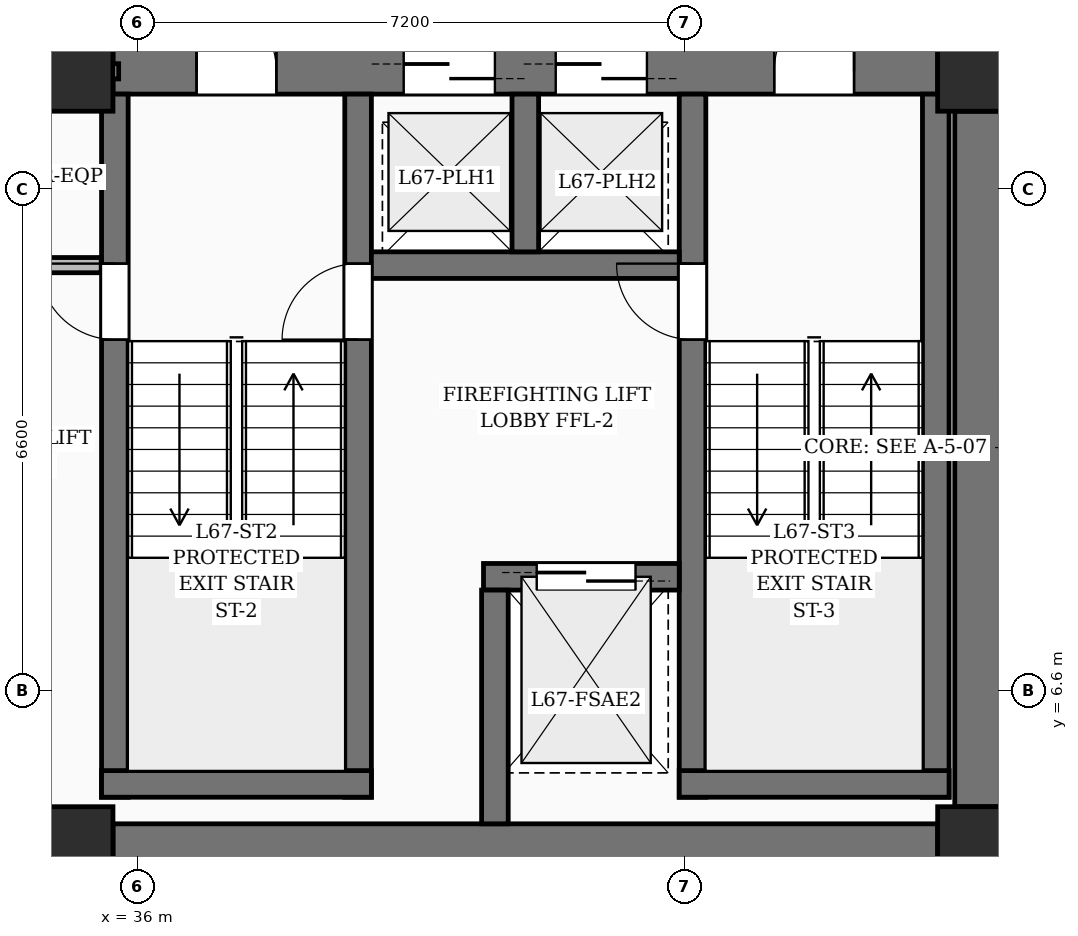
"""IFC4 building model, lengths in metres.
Left out: names, types, materials, properties, quantities, classifications, styles, units other than length and angle.
Written with IfcOpenShell. Run it as: python <this file> out.ifc"""

import sys

from ifc_helpers import new_model, si_unit, direction, frame, frame_2d, origin, origin_2d, place, context, subcontext, project, spatial, rectangle, extrude, element, fill, save


model = new_model("IFC4")
c1 = context("Model", 3, precision=1e-05, world=origin(), true_north=direction((0.0, 1.0)))
c2 = subcontext(c1, "Body", "Model", "MODEL_VIEW")
j1 = project(units=[si_unit("LENGTHUNIT", "METRE"), si_unit("PLANEANGLEUNIT", "RADIAN")], contexts=[c1])
p1 = place(None, origin())
s1 = spatial("IfcSite", under=j1, at=p1, CompositionType="ELEMENT")
p2 = place(p1, origin())
s2 = spatial("IfcBuilding", under=s1, at=p2, CompositionType="ELEMENT")
p3 = place(p2, frame((0.0, 0.0, 259.5)))
s3 = spatial("IfcBuildingStorey", under=s2, at=p3, CompositionType="ELEMENT", Elevation=259.5)
for number, where, z_axis, x_axis in (
    (1, (35.15, 4.55, 0.0), (0.0, 0.0, 1.0), (1.0, 0.0, 0.0)),
    (2, (47.05, 4.55, 0.0), (0.0, 0.0, 1.0), (1.0, 0.0, 0.0)),
    (3, (35.15, 14.75, 0.0), (0.0, 0.0, 1.0), (1.0, 0.0, 0.0)),
    (4, (47.05, 14.75, 0.0), (0.0, 0.0, 1.0), (1.0, 0.0, 0.0)),
):
    element("IfcColumn", number, at=place(p3, frame(where, z_axis=z_axis, x_axis=x_axis)), inside=s3, PredefinedType="COLUMN", context=c2, shape_type="SweptSolid", body=[
        extrude(rectangle(XDim=1.05, YDim=1.05, at=origin_2d()), origin(), (0.0, 0.0, 1.0), 3.75),
    ])
p4 = place(p3, frame((35.675, 4.55, 0.0), z_axis=(0.0, 0.0, 1.0), x_axis=(1.0, 0.0, 0.0)))
e5 = element("IfcWall", 5, at=p4, inside=s3, PredefinedType="SHEAR", context=c2, shape_type="SweptSolid", body=[
    extrude(rectangle(XDim=10.85, YDim=0.6, at=frame_2d((5.425, 0.0))), origin(), (0.0, 0.0, 1.0), 3.75),
])
p5 = place(p3, frame((35.675, 14.75, 0.0), z_axis=(0.0, 0.0, 1.0), x_axis=(1.0, 0.0, 0.0)))
e6 = element("IfcWall", 6, at=p5, inside=s3, PredefinedType="SHEAR", context=c2, shape_type="SweptSolid", body=[
    extrude(rectangle(XDim=10.85, YDim=0.6, at=frame_2d((5.425, 0.0))), origin(), (0.0, 0.0, 1.0), 3.75),
])
p6 = place(p5, frame((1.1, 0.0, 0.0)))
e7 = element("IfcOpeningElement", 7, at=p6, cuts=e6, PredefinedType="OPENING", context=c2, shape_type="SweptSolid", body=[
    extrude(rectangle(XDim=1.05, YDim=2.15, at=frame_2d((0.525, 1.075))), frame((0.0, 0.31, 0.0), z_axis=(0.0, -1.0, 0.0), x_axis=(1.0, 0.0, 0.0)), (0.0, 0.0, 1.0), 0.62),
])
p7 = place(p5, frame((8.7, 0.0, 0.0)))
e8 = element("IfcOpeningElement", 8, at=p7, cuts=e6, PredefinedType="OPENING", context=c2, shape_type="SweptSolid", body=[
    extrude(rectangle(XDim=1.05, YDim=2.15, at=frame_2d((0.525, 1.075))), frame((0.0, 0.31, 0.0), z_axis=(0.0, -1.0, 0.0), x_axis=(1.0, 0.0, 0.0)), (0.0, 0.0, 1.0), 0.62),
])
p8 = place(p5, frame((3.825, 0.0, 0.0)))
e9 = element("IfcOpeningElement", 9, at=p8, cuts=e6, PredefinedType="OPENING", context=c2, shape_type="SweptSolid", body=[
    extrude(rectangle(XDim=1.2, YDim=2.2, at=frame_2d((0.6, 1.1))), frame((0.0, 0.31, 0.0), z_axis=(0.0, -1.0, 0.0), x_axis=(1.0, 0.0, 0.0)), (0.0, 0.0, 1.0), 0.62),
])
p9 = place(p5, frame((5.825, 0.0, 0.0)))
e10 = element("IfcOpeningElement", 10, at=p9, cuts=e6, PredefinedType="OPENING", context=c2, shape_type="SweptSolid", body=[
    extrude(rectangle(XDim=1.2, YDim=2.2, at=frame_2d((0.6, 1.1))), frame((0.0, 0.31, 0.0), z_axis=(0.0, -1.0, 0.0), x_axis=(1.0, 0.0, 0.0)), (0.0, 0.0, 1.0), 0.62),
])
p10 = place(p3, frame((47.05, 5.075, 0.0), z_axis=(0.0, 0.0, 1.0), x_axis=(0.0, 1.0, 0.0)))
e11 = element("IfcWall", 11, at=p10, inside=s3, PredefinedType="SHEAR", context=c2, shape_type="SweptSolid", body=[
    extrude(rectangle(XDim=9.15, YDim=0.6, at=frame_2d((4.575, 0.0))), origin(), (0.0, 0.0, 1.0), 3.75),
])
p11 = place(p3, frame((35.7, 5.2, 0.0), z_axis=(0.0, 0.0, 1.0), x_axis=(0.0, 1.0, 0.0)))
e12 = element("IfcWall", 12, at=p11, inside=s3, PredefinedType="SOLIDWALL", context=c2, shape_type="SweptSolid", body=[
    extrude(rectangle(XDim=9.25, YDim=0.35, at=frame_2d((4.625, 0.0))), origin(), (0.0, 0.0, 1.0), 3.75),
])
p12 = place(p11, frame((6.02, 0.0, 0.0)))
e13 = element("IfcOpeningElement", 13, at=p12, cuts=e12, PredefinedType="OPENING", context=c2, shape_type="SweptSolid", body=[
    extrude(rectangle(XDim=1.0, YDim=2.15, at=frame_2d((0.5, 1.075))), frame((0.0, 0.185, 0.0), z_axis=(0.0, -1.0, 0.0), x_axis=(1.0, 0.0, 0.0)), (0.0, 0.0, 1.0), 0.37),
])
p13 = place(p3, frame((38.9, 5.2, 0.0), z_axis=(0.0, 0.0, 1.0), x_axis=(0.0, 1.0, 0.0)))
e14 = element("IfcWall", 14, at=p13, inside=s3, PredefinedType="SOLIDWALL", context=c2, shape_type="SweptSolid", body=[
    extrude(rectangle(XDim=9.25, YDim=0.35, at=frame_2d((4.625, 0.0))), origin(), (0.0, 0.0, 1.0), 3.75),
])
p14 = place(p13, frame((6.02, 0.0, 0.0)))
e15 = element("IfcOpeningElement", 15, at=p14, cuts=e14, PredefinedType="OPENING", context=c2, shape_type="SweptSolid", body=[
    extrude(rectangle(XDim=1.0, YDim=2.15, at=frame_2d((0.5, 1.075))), frame((0.0, 0.185, 0.0), z_axis=(0.0, -1.0, 0.0), x_axis=(1.0, 0.0, 0.0)), (0.0, 0.0, 1.0), 0.37),
])
p15 = place(p3, frame((35.525, 5.375, 0.0), z_axis=(0.0, 0.0, 1.0), x_axis=(1.0, 0.0, 0.0)))
e16 = element("IfcWall", 16, at=p15, inside=s3, PredefinedType="SOLIDWALL", context=c2, shape_type="SweptSolid", body=[
    extrude(rectangle(XDim=3.55, YDim=0.35, at=frame_2d((1.775, 0.0))), origin(), (0.0, 0.0, 1.0), 3.75),
])
p16 = place(p3, frame((43.3, 5.2, 0.0), z_axis=(0.0, 0.0, 1.0), x_axis=(0.0, 1.0, 0.0)))
e17 = element("IfcWall", 17, at=p16, inside=s3, PredefinedType="SOLIDWALL", context=c2, shape_type="SweptSolid", body=[
    extrude(rectangle(XDim=9.25, YDim=0.35, at=frame_2d((4.625, 0.0))), origin(), (0.0, 0.0, 1.0), 3.75),
])
p17 = place(p16, frame((6.02, 0.0, 0.0)))
e18 = element("IfcOpeningElement", 18, at=p17, cuts=e17, PredefinedType="OPENING", context=c2, shape_type="SweptSolid", body=[
    extrude(rectangle(XDim=1.0, YDim=2.15, at=frame_2d((0.5, 1.075))), frame((0.0, 0.185, 0.0), z_axis=(0.0, -1.0, 0.0), x_axis=(1.0, 0.0, 0.0)), (0.0, 0.0, 1.0), 0.37),
])
p18 = place(p3, frame((46.5, 5.2, 0.0), z_axis=(0.0, 0.0, 1.0), x_axis=(0.0, 1.0, 0.0)))
e19 = element("IfcWall", 19, at=p18, inside=s3, PredefinedType="SOLIDWALL", context=c2, shape_type="SweptSolid", body=[
    extrude(rectangle(XDim=9.25, YDim=0.35, at=frame_2d((4.625, 0.0))), origin(), (0.0, 0.0, 1.0), 3.75),
])
p19 = place(p3, frame((43.125, 5.375, 0.0), z_axis=(0.0, 0.0, 1.0), x_axis=(1.0, 0.0, 0.0)))
e20 = element("IfcWall", 20, at=p19, inside=s3, PredefinedType="SOLIDWALL", context=c2, shape_type="SweptSolid", body=[
    extrude(rectangle(XDim=3.55, YDim=0.35, at=frame_2d((1.775, 0.0))), origin(), (0.0, 0.0, 1.0), 3.75),
])
p20 = place(p3, frame((40.55, 8.1, 0.0), z_axis=(0.0, 0.0, 1.0), x_axis=(1.0, 0.0, 0.0)))
e21 = element("IfcWall", 21, at=p20, inside=s3, PredefinedType="SOLIDWALL", context=c2, shape_type="SweptSolid", body=[
    extrude(rectangle(XDim=2.575, YDim=0.35, at=frame_2d((1.288, 0.0))), origin(), (0.0, 0.0, 1.0), 3.75),
])
p21 = place(p20, frame((0.7, 0.0, 0.0)))
e22 = element("IfcOpeningElement", 22, at=p21, cuts=e21, PredefinedType="OPENING", context=c2, shape_type="SweptSolid", body=[
    extrude(rectangle(XDim=1.3, YDim=2.25, at=frame_2d((0.65, 1.125))), frame((0.0, 0.185, 0.0), z_axis=(0.0, -1.0, 0.0), x_axis=(1.0, 0.0, 0.0)), (0.0, 0.0, 1.0), 0.37),
])
p22 = place(p3, frame((40.7, 4.85, 0.0), z_axis=(0.0, 0.0, 1.0), x_axis=(0.0, 1.0, 0.0)))
e23 = element("IfcWall", 23, at=p22, inside=s3, PredefinedType="SOLIDWALL", context=c2, shape_type="SweptSolid", body=[
    extrude(rectangle(XDim=3.075, YDim=0.35, at=frame_2d((1.538, 0.0))), origin(), (0.0, 0.0, 1.0), 3.75),
])
p23 = place(p3, frame((39.075, 12.2, 0.0), z_axis=(0.0, 0.0, 1.0), x_axis=(1.0, 0.0, 0.0)))
e24 = element("IfcWall", 24, at=p23, inside=s3, PredefinedType="SOLIDWALL", context=c2, shape_type="SweptSolid", body=[
    extrude(rectangle(XDim=4.05, YDim=0.35, at=frame_2d((2.025, 0.0))), origin(), (0.0, 0.0, 1.0), 3.75),
])
p24 = place(p3, frame((41.1, 12.375, 0.0), z_axis=(0.0, 0.0, 1.0), x_axis=(0.0, 1.0, 0.0)))
e25 = element("IfcWall", 25, at=p24, inside=s3, PredefinedType="SOLIDWALL", context=c2, shape_type="SweptSolid", body=[
    extrude(rectangle(XDim=2.075, YDim=0.35, at=frame_2d((1.038, 0.0))), origin(), (0.0, 0.0, 1.0), 3.75),
])
p25 = place(p3, frame((34.72, 14.75, 0.0), z_axis=(0.0, 0.0, 1.0), x_axis=(1.0, 0.0, 0.0)))
e26 = element("IfcWall", 26, at=p25, inside=s3, PredefinedType="PARTITIONING", context=c2, shape_type="SweptSolid", body=[
    extrude(rectangle(XDim=1.03, YDim=0.2, at=frame_2d((0.515, 0.0))), origin(), (0.0, 0.0, 1.0), 2.685),
])
p26 = place(p3, frame((31.48, 12.2, 0.0), z_axis=(0.0, 0.0, 1.0), x_axis=(1.0, 0.0, 0.0)))
e27 = element("IfcWall", 27, at=p26, inside=s3, PredefinedType="PARTITIONING", context=c2, shape_type="SweptSolid", body=[
    extrude(rectangle(XDim=4.04, YDim=0.2, at=frame_2d((2.02, 0.0))), origin(), (0.0, 0.0, 1.0), 3.5),
])
p27 = place(p26, frame((1.545, 0.0, 0.0)))
e28 = element("IfcOpeningElement", 28, at=p27, cuts=e27, PredefinedType="OPENING", context=c2, shape_type="SweptSolid", body=[
    extrude(rectangle(XDim=0.95, YDim=2.15, at=frame_2d((0.475, 1.075))), frame((0.0, 0.11, 0.0), z_axis=(0.0, -1.0, 0.0), x_axis=(1.0, 0.0, 0.0)), (0.0, 0.0, 1.0), 0.22),
])
p28 = place(p6, origin())
e29 = element("IfcDoor", 29, at=p28, inside=s3, OperationType="SINGLE_SWING_LEFT", PredefinedType="DOOR", context=c2, shape_type="SweptSolid", body=[
    extrude(rectangle(XDim=1.05, YDim=2.15, at=frame_2d((0.525, 1.075))), frame((0.0, 0.025, 0.0), z_axis=(0.0, -1.0, 0.0), x_axis=(1.0, 0.0, 0.0)), (0.0, 0.0, 1.0), 0.05),
])
fill(e7, e29)
p29 = place(p7, origin())
e30 = element("IfcDoor", 30, at=p29, inside=s3, OperationType="SINGLE_SWING_RIGHT", PredefinedType="DOOR", context=c2, shape_type="SweptSolid", body=[
    extrude(rectangle(XDim=1.05, YDim=2.15, at=frame_2d((0.525, 1.075))), frame((0.0, 0.025, 0.0), z_axis=(0.0, -1.0, 0.0), x_axis=(1.0, 0.0, 0.0)), (0.0, 0.0, 1.0), 0.05),
])
fill(e8, e30)
p30 = place(p12, origin())
e31 = element("IfcDoor", 31, at=p30, inside=s3, OperationType="SINGLE_SWING_RIGHT", PredefinedType="DOOR", context=c2, shape_type="SweptSolid", body=[
    extrude(rectangle(XDim=1.0, YDim=2.15, at=frame_2d((0.5, 1.075))), frame((0.0, 0.025, 0.0), z_axis=(0.0, -1.0, 0.0), x_axis=(1.0, 0.0, 0.0)), (0.0, 0.0, 1.0), 0.05),
])
fill(e13, e31)
p31 = place(p14, origin())
e32 = element("IfcDoor", 32, at=p31, inside=s3, OperationType="SINGLE_SWING_LEFT", PredefinedType="DOOR", context=c2, shape_type="SweptSolid", body=[
    extrude(rectangle(XDim=1.0, YDim=2.15, at=frame_2d((0.5, 1.075))), frame((0.0, 0.025, 0.0), z_axis=(0.0, -1.0, 0.0), x_axis=(1.0, 0.0, 0.0)), (0.0, 0.0, 1.0), 0.05),
])
fill(e15, e32)
p32 = place(p17, origin())
e33 = element("IfcDoor", 33, at=p32, inside=s3, OperationType="SINGLE_SWING_RIGHT", PredefinedType="DOOR", context=c2, shape_type="SweptSolid", body=[
    extrude(rectangle(XDim=1.0, YDim=2.15, at=frame_2d((0.5, 1.075))), frame((0.0, 0.025, 0.0), z_axis=(0.0, -1.0, 0.0), x_axis=(1.0, 0.0, 0.0)), (0.0, 0.0, 1.0), 0.05),
])
fill(e18, e33)
p33 = place(p21, origin())
e34 = element("IfcDoor", 34, at=p33, inside=s3, OperationType="DOUBLE_DOOR_SLIDING", PredefinedType="DOOR", context=c2, shape_type="SweptSolid", body=[
    extrude(rectangle(XDim=1.3, YDim=2.25, at=frame_2d((0.65, 1.125))), frame((0.0, 0.025, 0.0), z_axis=(0.0, -1.0, 0.0), x_axis=(1.0, 0.0, 0.0)), (0.0, 0.0, 1.0), 0.05),
])
fill(e22, e34)
p34 = place(p8, origin())
e35 = element("IfcDoor", 35, at=p34, inside=s3, OperationType="DOUBLE_DOOR_SLIDING", PredefinedType="DOOR", context=c2, shape_type="SweptSolid", body=[
    extrude(rectangle(XDim=1.2, YDim=2.2, at=frame_2d((0.6, 1.1))), frame((0.0, 0.025, 0.0), z_axis=(0.0, -1.0, 0.0), x_axis=(1.0, 0.0, 0.0)), (0.0, 0.0, 1.0), 0.05),
])
fill(e9, e35)
p35 = place(p9, origin())
e36 = element("IfcDoor", 36, at=p35, inside=s3, OperationType="DOUBLE_DOOR_SLIDING", PredefinedType="DOOR", context=c2, shape_type="SweptSolid", body=[
    extrude(rectangle(XDim=1.2, YDim=2.2, at=frame_2d((0.6, 1.1))), frame((0.0, 0.025, 0.0), z_axis=(0.0, -1.0, 0.0), x_axis=(1.0, 0.0, 0.0)), (0.0, 0.0, 1.0), 0.05),
])
fill(e10, e36)
save(model, sys.argv[1])
